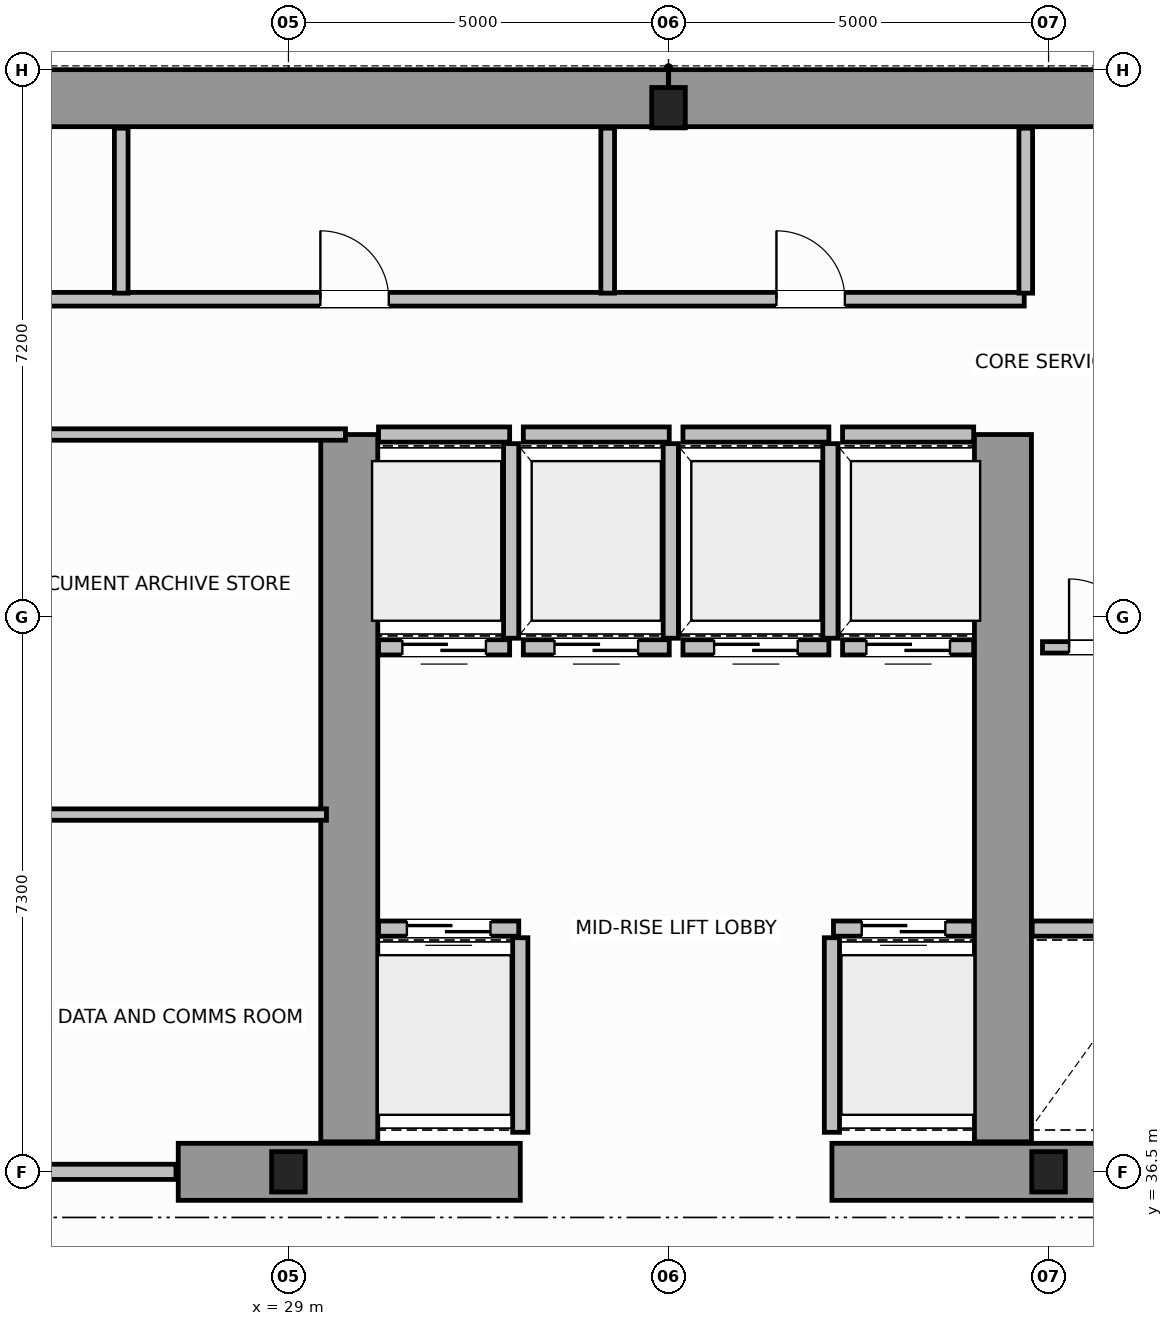
"""IFC4 building model, lengths in metres.
Left out: names, types, materials, properties, quantities, classifications, styles, units other than length and angle.
Written with IfcOpenShell. Run it as: python <this file> out.ifc"""

import sys

from ifc_helpers import new_model, si_unit, direction, frame, frame_2d, origin, origin_2d, place, context, subcontext, project, spatial, rectangle, i_section, extrude, source, transform, mapped, element, fill, save


model = new_model("IFC4")
c1 = context("Model", 3, precision=1e-05, world=origin(), true_north=direction((0.0, 1.0)))
c2 = subcontext(c1, "Body", "Model", "MODEL_VIEW")
j1 = project(units=[si_unit("LENGTHUNIT", "METRE"), si_unit("PLANEANGLEUNIT", "RADIAN")], contexts=[c1])
p1 = place(None, origin())
s1 = spatial("IfcSite", under=j1, at=p1, CompositionType="ELEMENT")
p2 = place(p1, origin())
s2 = spatial("IfcBuilding", under=s1, at=p2, CompositionType="ELEMENT")
p3 = place(p2, frame((0.0, 0.0, 133.8)))
s3 = spatial("IfcBuildingStorey", under=s2, at=p3, CompositionType="ELEMENT", Elevation=133.8)
m1 = source(origin(), c2, "Body", "SweptSolid", [
    extrude(i_section(OverallWidth=0.442, OverallDepth=0.531, WebThickness=0.065, FlangeThickness=0.076, FilletRadius=0.015, at=origin_2d()), origin(), (0.0, 0.0, 1.0), 3.8),
])
for number, where, z_axis, x_axis in (
    (1, (29.0, 36.5, 0.0), (0.0, 0.0, 1.0), (1.0, 0.0, 0.0)),
    (2, (39.0, 36.5, 0.0), (0.0, 0.0, 1.0), (1.0, 0.0, 0.0)),
    (3, (34.0, 50.5, 0.0), (0.0, 0.0, 1.0), (1.0, 0.0, 0.0)),
):
    element("IfcColumn", number, at=place(p3, frame(where, z_axis=z_axis, x_axis=x_axis)), inside=s3, PredefinedType="COLUMN", context=c2, shape_type="MappedRepresentation", body=[
        mapped(m1, transform((0.0, 0.0, 0.0), scale=1.0)),
    ])
for number, where, z_axis, x_axis in (
    (4, (14.379, 50.625, 0.0), (0.0, 0.0, 1.0), (1.0, 0.0, 0.0)),
    (5, (34.002, 50.625, 0.0), (0.0, 0.0, 1.0), (1.0, 0.0, 0.0)),
):
    element("IfcWall", number, at=place(p3, frame(where, z_axis=z_axis, x_axis=x_axis)), inside=s3, PredefinedType="SHEAR", context=c2, shape_type="SweptSolid", body=[
        extrude(rectangle(XDim=19.619, YDim=0.75, at=frame_2d((9.81, 0.0))), origin(), (0.0, 0.0, 1.0), 3.8),
    ])
for number, where, z_axis, x_axis in (
    (6, (27.55, 36.5, 0.0), (0.0, 0.0, 1.0), (1.0, 0.0, 0.0)),
    (7, (36.15, 36.5, 0.0), (0.0, 0.0, 1.0), (1.0, 0.0, 0.0)),
):
    element("IfcWall", number, at=place(p3, frame(where, z_axis=z_axis, x_axis=x_axis)), inside=s3, PredefinedType="SHEAR", context=c2, shape_type="SweptSolid", body=[
        extrude(rectangle(XDim=4.5, YDim=0.75, at=frame_2d((2.25, 0.0))), origin(), (0.0, 0.0, 1.0), 3.8),
    ])
for number, where, z_axis, x_axis in (
    (8, (29.8, 36.895, 0.0), (0.0, 0.0, 1.0), (0.0, 1.0, 0.0)),
    (9, (38.4, 36.895, 0.0), (0.0, 0.0, 1.0), (0.0, 1.0, 0.0)),
):
    element("IfcWall", number, at=place(p3, frame(where, z_axis=z_axis, x_axis=x_axis)), inside=s3, PredefinedType="SHEAR", context=c2, shape_type="SweptSolid", body=[
        extrude(rectangle(XDim=9.305, YDim=0.75, at=frame_2d((4.652, 0.0))), origin(), (0.0, 0.0, 1.0), 3.8),
    ])
p4 = place(p3, frame((30.185, 39.7, 0.0), z_axis=(0.0, 0.0, 1.0), x_axis=(1.0, 0.0, 0.0)))
e10 = element("IfcWall", 10, at=p4, inside=s3, PredefinedType="SOLIDWALL", context=c2, shape_type="SweptSolid", body=[
    extrude(rectangle(XDim=1.845, YDim=0.2, at=frame_2d((0.922, 0.0))), origin(), (0.0, 0.0, 1.0), 3.58),
])
p5 = place(p4, frame((0.373, 0.0, 0.0)))
e11 = element("IfcOpeningElement", 11, at=p5, cuts=e10, PredefinedType="OPENING", context=c2, shape_type="SweptSolid", body=[
    extrude(rectangle(XDim=1.1, YDim=2.15, at=frame_2d((0.55, 1.075))), frame((0.0, 0.11, 0.0), z_axis=(0.0, -1.0, 0.0), x_axis=(1.0, 0.0, 0.0)), (0.0, 0.0, 1.0), 0.22),
])
p6 = place(p3, frame((32.05, 37.02, 0.0), z_axis=(0.0, 0.0, 1.0), x_axis=(0.0, 1.0, 0.0)))
e12 = element("IfcWall", 12, at=p6, inside=s3, PredefinedType="SOLIDWALL", context=c2, shape_type="SweptSolid", body=[
    extrude(rectangle(XDim=2.56, YDim=0.2, at=frame_2d((1.28, 0.0))), origin(), (0.0, 0.0, 1.0), 3.58),
])
p7 = place(p3, frame((36.17, 39.7, 0.0), z_axis=(0.0, 0.0, 1.0), x_axis=(1.0, 0.0, 0.0)))
e13 = element("IfcWall", 13, at=p7, inside=s3, PredefinedType="SOLIDWALL", context=c2, shape_type="SweptSolid", body=[
    extrude(rectangle(XDim=1.845, YDim=0.2, at=frame_2d((0.922, 0.0))), origin(), (0.0, 0.0, 1.0), 3.58),
])
p8 = place(p7, frame((0.372, 0.0, 0.0)))
e14 = element("IfcOpeningElement", 14, at=p8, cuts=e13, PredefinedType="OPENING", context=c2, shape_type="SweptSolid", body=[
    extrude(rectangle(XDim=1.1, YDim=2.15, at=frame_2d((0.55, 1.075))), frame((0.0, 0.11, 0.0), z_axis=(0.0, -1.0, 0.0), x_axis=(1.0, 0.0, 0.0)), (0.0, 0.0, 1.0), 0.22),
])
p9 = place(p3, frame((36.15, 37.02, 0.0), z_axis=(0.0, 0.0, 1.0), x_axis=(0.0, 1.0, 0.0)))
e15 = element("IfcWall", 15, at=p9, inside=s3, PredefinedType="SOLIDWALL", context=c2, shape_type="SweptSolid", body=[
    extrude(rectangle(XDim=2.56, YDim=0.2, at=frame_2d((1.28, 0.0))), origin(), (0.0, 0.0, 1.0), 3.58),
])
p10 = place(p3, frame((30.185, 43.4, 0.0), z_axis=(0.0, 0.0, 1.0), x_axis=(1.0, 0.0, 0.0)))
e16 = element("IfcWall", 16, at=p10, inside=s3, PredefinedType="SOLIDWALL", context=c2, shape_type="SweptSolid", body=[
    extrude(rectangle(XDim=1.725, YDim=0.2, at=frame_2d((0.862, 0.0))), origin(), (0.0, 0.0, 1.0), 3.58),
])
p11 = place(p10, frame((0.313, 0.0, 0.0)))
e17 = element("IfcOpeningElement", 17, at=p11, cuts=e16, PredefinedType="OPENING", context=c2, shape_type="SweptSolid", body=[
    extrude(rectangle(XDim=1.1, YDim=2.15, at=frame_2d((0.55, 1.075))), frame((0.0, 0.11, 0.0), z_axis=(0.0, -1.0, 0.0), x_axis=(1.0, 0.0, 0.0)), (0.0, 0.0, 1.0), 0.22),
])
p12 = place(p3, frame((30.185, 46.2, 0.0), z_axis=(0.0, 0.0, 1.0), x_axis=(1.0, 0.0, 0.0)))
e18 = element("IfcWall", 18, at=p12, inside=s3, PredefinedType="SOLIDWALL", context=c2, shape_type="SweptSolid", body=[
    extrude(rectangle(XDim=1.725, YDim=0.2, at=frame_2d((0.862, 0.0))), origin(), (0.0, 0.0, 1.0), 3.58),
])
p13 = place(p3, frame((31.93, 43.52, 0.0), z_axis=(0.0, 0.0, 1.0), x_axis=(0.0, 1.0, 0.0)))
e19 = element("IfcWall", 19, at=p13, inside=s3, PredefinedType="SOLIDWALL", context=c2, shape_type="SweptSolid", body=[
    extrude(rectangle(XDim=2.56, YDim=0.2, at=frame_2d((1.28, 0.0))), origin(), (0.0, 0.0, 1.0), 3.58),
])
p14 = place(p3, frame((32.09, 43.4, 0.0), z_axis=(0.0, 0.0, 1.0), x_axis=(1.0, 0.0, 0.0)))
e20 = element("IfcWall", 20, at=p14, inside=s3, PredefinedType="SOLIDWALL", context=c2, shape_type="SweptSolid", body=[
    extrude(rectangle(XDim=1.92, YDim=0.2, at=frame_2d((0.96, 0.0))), origin(), (0.0, 0.0, 1.0), 3.58),
])
p15 = place(p14, frame((0.41, 0.0, 0.0)))
e21 = element("IfcOpeningElement", 21, at=p15, cuts=e20, PredefinedType="OPENING", context=c2, shape_type="SweptSolid", body=[
    extrude(rectangle(XDim=1.1, YDim=2.15, at=frame_2d((0.55, 1.075))), frame((0.0, 0.11, 0.0), z_axis=(0.0, -1.0, 0.0), x_axis=(1.0, 0.0, 0.0)), (0.0, 0.0, 1.0), 0.22),
])
p16 = place(p3, frame((32.09, 46.2, 0.0), z_axis=(0.0, 0.0, 1.0), x_axis=(1.0, 0.0, 0.0)))
e22 = element("IfcWall", 22, at=p16, inside=s3, PredefinedType="SOLIDWALL", context=c2, shape_type="SweptSolid", body=[
    extrude(rectangle(XDim=1.92, YDim=0.2, at=frame_2d((0.96, 0.0))), origin(), (0.0, 0.0, 1.0), 3.58),
])
p17 = place(p3, frame((34.03, 43.52, 0.0), z_axis=(0.0, 0.0, 1.0), x_axis=(0.0, 1.0, 0.0)))
e23 = element("IfcWall", 23, at=p17, inside=s3, PredefinedType="SOLIDWALL", context=c2, shape_type="SweptSolid", body=[
    extrude(rectangle(XDim=2.56, YDim=0.2, at=frame_2d((1.28, 0.0))), origin(), (0.0, 0.0, 1.0), 3.58),
])
p18 = place(p3, frame((34.19, 43.4, 0.0), z_axis=(0.0, 0.0, 1.0), x_axis=(1.0, 0.0, 0.0)))
e24 = element("IfcWall", 24, at=p18, inside=s3, PredefinedType="SOLIDWALL", context=c2, shape_type="SweptSolid", body=[
    extrude(rectangle(XDim=1.92, YDim=0.2, at=frame_2d((0.96, 0.0))), origin(), (0.0, 0.0, 1.0), 3.58),
])
p19 = place(p18, frame((0.41, 0.0, 0.0)))
e25 = element("IfcOpeningElement", 25, at=p19, cuts=e24, PredefinedType="OPENING", context=c2, shape_type="SweptSolid", body=[
    extrude(rectangle(XDim=1.1, YDim=2.15, at=frame_2d((0.55, 1.075))), frame((0.0, 0.11, 0.0), z_axis=(0.0, -1.0, 0.0), x_axis=(1.0, 0.0, 0.0)), (0.0, 0.0, 1.0), 0.22),
])
p20 = place(p3, frame((34.19, 46.2, 0.0), z_axis=(0.0, 0.0, 1.0), x_axis=(1.0, 0.0, 0.0)))
e26 = element("IfcWall", 26, at=p20, inside=s3, PredefinedType="SOLIDWALL", context=c2, shape_type="SweptSolid", body=[
    extrude(rectangle(XDim=1.92, YDim=0.2, at=frame_2d((0.96, 0.0))), origin(), (0.0, 0.0, 1.0), 3.58),
])
p21 = place(p3, frame((36.13, 43.52, 0.0), z_axis=(0.0, 0.0, 1.0), x_axis=(0.0, 1.0, 0.0)))
e27 = element("IfcWall", 27, at=p21, inside=s3, PredefinedType="SOLIDWALL", context=c2, shape_type="SweptSolid", body=[
    extrude(rectangle(XDim=2.56, YDim=0.2, at=frame_2d((1.28, 0.0))), origin(), (0.0, 0.0, 1.0), 3.58),
])
p22 = place(p3, frame((36.29, 43.4, 0.0), z_axis=(0.0, 0.0, 1.0), x_axis=(1.0, 0.0, 0.0)))
e28 = element("IfcWall", 28, at=p22, inside=s3, PredefinedType="SOLIDWALL", context=c2, shape_type="SweptSolid", body=[
    extrude(rectangle(XDim=1.725, YDim=0.2, at=frame_2d((0.862, 0.0))), origin(), (0.0, 0.0, 1.0), 3.58),
])
p23 = place(p22, frame((0.313, 0.0, 0.0)))
e29 = element("IfcOpeningElement", 29, at=p23, cuts=e28, PredefinedType="OPENING", context=c2, shape_type="SweptSolid", body=[
    extrude(rectangle(XDim=1.1, YDim=2.15, at=frame_2d((0.55, 1.075))), frame((0.0, 0.11, 0.0), z_axis=(0.0, -1.0, 0.0), x_axis=(1.0, 0.0, 0.0)), (0.0, 0.0, 1.0), 0.22),
])
p24 = place(p3, frame((36.29, 46.2, 0.0), z_axis=(0.0, 0.0, 1.0), x_axis=(1.0, 0.0, 0.0)))
e30 = element("IfcWall", 30, at=p24, inside=s3, PredefinedType="SOLIDWALL", context=c2, shape_type="SweptSolid", body=[
    extrude(rectangle(XDim=1.725, YDim=0.2, at=frame_2d((0.862, 0.0))), origin(), (0.0, 0.0, 1.0), 3.58),
])
p25 = place(p3, frame((38.785, 39.7, 0.0), z_axis=(0.0, 0.0, 1.0), x_axis=(1.0, 0.0, 0.0)))
e31 = element("IfcWall", 31, at=p25, inside=s3, PredefinedType="SOLIDWALL", context=c2, shape_type="SweptSolid", body=[
    extrude(rectangle(XDim=1.845, YDim=0.2, at=frame_2d((0.922, 0.0))), origin(), (0.0, 0.0, 1.0), 3.58),
])
p26 = place(p3, frame((21.25, 36.5, 0.0), z_axis=(0.0, 0.0, 1.0), x_axis=(1.0, 0.0, 0.0)))
e32 = element("IfcWall", 32, at=p26, inside=s3, PredefinedType="SOLIDWALL", context=c2, shape_type="SweptSolid", body=[
    extrude(rectangle(XDim=6.27, YDim=0.2, at=frame_2d((3.135, 0.0))), origin(), (0.0, 0.0, 1.0), 2.37),
])
p27 = place(p26, frame((2.6, 0.0, 0.0)))
e33 = element("IfcOpeningElement", 33, at=p27, cuts=e32, PredefinedType="OPENING", context=c2, shape_type="SweptSolid", body=[
    extrude(rectangle(XDim=1.1, YDim=2.15, at=frame_2d((0.55, 1.075))), frame((0.0, 0.11, 0.0), z_axis=(0.0, -1.0, 0.0), x_axis=(1.0, 0.0, 0.0)), (0.0, 0.0, 1.0), 0.22),
])
p28 = place(p3, frame((21.25, 46.2, 0.0), z_axis=(0.0, 0.0, 1.0), x_axis=(1.0, 0.0, 0.0)))
e34 = element("IfcWall", 34, at=p28, inside=s3, PredefinedType="PARTITIONING", context=c2, shape_type="SweptSolid", body=[
    extrude(rectangle(XDim=8.5, YDim=0.15, at=frame_2d((4.25, 0.0))), origin(), (0.0, 0.0, 1.0), 3.58),
])
p29 = place(p3, frame((21.5, 41.2, 0.0), z_axis=(0.0, 0.0, 1.0), x_axis=(1.0, 0.0, 0.0)))
e35 = element("IfcWall", 35, at=p29, inside=s3, PredefinedType="PARTITIONING", context=c2, shape_type="SweptSolid", body=[
    extrude(rectangle(XDim=8.0, YDim=0.15, at=frame_2d((4.0, 0.0))), origin(), (0.0, 0.0, 1.0), 3.58),
])
p30 = place(p29, frame((3.4, 0.0, 0.0)))
e36 = element("IfcOpeningElement", 36, at=p30, cuts=e35, PredefinedType="OPENING", context=c2, shape_type="SweptSolid", body=[
    extrude(rectangle(XDim=0.9, YDim=2.1, at=frame_2d((0.45, 1.05))), frame((0.0, 0.085, 0.0), z_axis=(0.0, -1.0, 0.0), x_axis=(1.0, 0.0, 0.0)), (0.0, 0.0, 1.0), 0.17),
])
p31 = place(p3, frame((38.92, 43.4, 0.0), z_axis=(0.0, 0.0, 1.0), x_axis=(1.0, 0.0, 0.0)))
e37 = element("IfcWall", 37, at=p31, inside=s3, PredefinedType="PARTITIONING", context=c2, shape_type="SweptSolid", body=[
    extrude(rectangle(XDim=1.6, YDim=0.15, at=frame_2d((0.8, 0.0))), origin(), (0.0, 0.0, 1.0), 3.58),
])
p32 = place(p31, frame((0.35, 0.0, 0.0)))
e38 = element("IfcOpeningElement", 38, at=p32, cuts=e37, PredefinedType="OPENING", context=c2, shape_type="SweptSolid", body=[
    extrude(rectangle(XDim=0.9, YDim=2.1, at=frame_2d((0.45, 1.05))), frame((0.0, 0.085, 0.0), z_axis=(0.0, -1.0, 0.0), x_axis=(1.0, 0.0, 0.0)), (0.0, 0.0, 1.0), 0.17),
])
p33 = place(p3, frame((18.62, 47.98, 0.0), z_axis=(0.0, 0.0, 1.0), x_axis=(1.0, 0.0, 0.0)))
e39 = element("IfcWall", 39, at=p33, inside=s3, PredefinedType="PLUMBINGWALL", context=c2, shape_type="SweptSolid", body=[
    extrude(rectangle(XDim=20.06, YDim=0.18, at=frame_2d((10.03, 0.0))), origin(), (0.0, 0.0, 1.0), 3.58),
])
p34 = place(p33, frame((3.5, 0.0, 0.0)))
e40 = element("IfcOpeningElement", 40, at=p34, cuts=e39, PredefinedType="OPENING", context=c2, shape_type="SweptSolid", body=[
    extrude(rectangle(XDim=0.9, YDim=2.15, at=frame_2d((0.45, 1.075))), frame((0.0, 0.1, 0.0), z_axis=(0.0, -1.0, 0.0), x_axis=(1.0, 0.0, 0.0)), (0.0, 0.0, 1.0), 0.2),
])
p35 = place(p33, frame((10.8, 0.0, 0.0)))
e41 = element("IfcOpeningElement", 41, at=p35, cuts=e39, PredefinedType="OPENING", context=c2, shape_type="SweptSolid", body=[
    extrude(rectangle(XDim=0.9, YDim=2.15, at=frame_2d((0.45, 1.075))), frame((0.0, 0.1, 0.0), z_axis=(0.0, -1.0, 0.0), x_axis=(1.0, 0.0, 0.0)), (0.0, 0.0, 1.0), 0.2),
])
p36 = place(p33, frame((16.8, 0.0, 0.0)))
e42 = element("IfcOpeningElement", 42, at=p36, cuts=e39, PredefinedType="OPENING", context=c2, shape_type="SweptSolid", body=[
    extrude(rectangle(XDim=0.9, YDim=2.15, at=frame_2d((0.45, 1.075))), frame((0.0, 0.1, 0.0), z_axis=(0.0, -1.0, 0.0), x_axis=(1.0, 0.0, 0.0)), (0.0, 0.0, 1.0), 0.2),
])
for number, where, z_axis, x_axis in (
    (43, (26.8, 48.06, 0.0), (0.0, 0.0, 1.0), (0.0, 1.0, 0.0)),
    (44, (33.2, 48.06, 0.0), (0.0, 0.0, 1.0), (0.0, 1.0, 0.0)),
    (45, (38.7, 48.06, 0.0), (0.0, 0.0, 1.0), (0.0, 1.0, 0.0)),
):
    element("IfcWall", number, at=place(p3, frame(where, z_axis=z_axis, x_axis=x_axis)), inside=s3, PredefinedType="PLUMBINGWALL", context=c2, shape_type="SweptSolid", body=[
        extrude(rectangle(XDim=2.17, YDim=0.18, at=frame_2d((1.085, 0.0))), origin(), (0.0, 0.0, 1.0), 3.58),
    ])
m2 = source(origin(), c2, "Body", "SweptSolid", [
    extrude(rectangle(XDim=1.1, YDim=2.15, at=frame_2d((0.55, 1.075))), frame((0.0, 0.025, 0.0), z_axis=(0.0, -1.0, 0.0), x_axis=(1.0, 0.0, 0.0)), (0.0, 0.0, 1.0), 0.05),
])
p37 = place(p5, origin())
e46 = element("IfcDoor", 46, at=p37, inside=s3, OperationType="DOUBLE_DOOR_SLIDING", PredefinedType="DOOR", context=c2, shape_type="MappedRepresentation", body=[
    mapped(m2, transform((0.0, 0.0, 0.0), scale=1.0)),
])
fill(e11, e46)
p38 = place(p8, origin())
e47 = element("IfcDoor", 47, at=p38, inside=s3, OperationType="DOUBLE_DOOR_SLIDING", PredefinedType="DOOR", context=c2, shape_type="MappedRepresentation", body=[
    mapped(m2, transform((0.0, 0.0, 0.0), scale=1.0)),
])
fill(e14, e47)
p39 = place(p11, origin())
e48 = element("IfcDoor", 48, at=p39, inside=s3, OperationType="DOUBLE_DOOR_SLIDING", PredefinedType="DOOR", context=c2, shape_type="MappedRepresentation", body=[
    mapped(m2, transform((0.0, 0.0, 0.0), scale=1.0)),
])
fill(e17, e48)
p40 = place(p15, origin())
e49 = element("IfcDoor", 49, at=p40, inside=s3, OperationType="DOUBLE_DOOR_SLIDING", PredefinedType="DOOR", context=c2, shape_type="MappedRepresentation", body=[
    mapped(m2, transform((0.0, 0.0, 0.0), scale=1.0)),
])
fill(e21, e49)
p41 = place(p19, origin())
e50 = element("IfcDoor", 50, at=p41, inside=s3, OperationType="DOUBLE_DOOR_SLIDING", PredefinedType="DOOR", context=c2, shape_type="MappedRepresentation", body=[
    mapped(m2, transform((0.0, 0.0, 0.0), scale=1.0)),
])
fill(e25, e50)
p42 = place(p23, origin())
e51 = element("IfcDoor", 51, at=p42, inside=s3, OperationType="DOUBLE_DOOR_SLIDING", PredefinedType="DOOR", context=c2, shape_type="MappedRepresentation", body=[
    mapped(m2, transform((0.0, 0.0, 0.0), scale=1.0)),
])
fill(e29, e51)
m3 = source(origin(), c2, "Body", "SweptSolid", [
    extrude(rectangle(XDim=0.9, YDim=2.1, at=frame_2d((0.45, 1.05))), frame((0.0, 0.025, 0.0), z_axis=(0.0, -1.0, 0.0), x_axis=(1.0, 0.0, 0.0)), (0.0, 0.0, 1.0), 0.05),
])
p43 = place(p32, origin())
e52 = element("IfcDoor", 52, at=p43, inside=s3, OperationType="SINGLE_SWING_LEFT", PredefinedType="DOOR", context=c2, shape_type="MappedRepresentation", body=[
    mapped(m3, transform((0.0, 0.0, 0.0), scale=1.0)),
])
fill(e38, e52)
m4 = source(origin(), c2, "Body", "SweptSolid", [
    extrude(rectangle(XDim=0.9, YDim=2.15, at=frame_2d((0.45, 1.075))), frame((0.0, 0.025, 0.0), z_axis=(0.0, -1.0, 0.0), x_axis=(1.0, 0.0, 0.0)), (0.0, 0.0, 1.0), 0.05),
])
p44 = place(p35, origin())
e53 = element("IfcDoor", 53, at=p44, inside=s3, OperationType="SINGLE_SWING_RIGHT", PredefinedType="DOOR", context=c2, shape_type="MappedRepresentation", body=[
    mapped(m4, transform((0.0, 0.0, 0.0), scale=1.0)),
])
fill(e41, e53)
p45 = place(p36, origin())
e54 = element("IfcDoor", 54, at=p45, inside=s3, OperationType="SINGLE_SWING_LEFT", PredefinedType="DOOR", context=c2, shape_type="MappedRepresentation", body=[
    mapped(m4, transform((0.0, 0.0, 0.0), scale=1.0)),
])
fill(e42, e54)
save(model, sys.argv[1])
